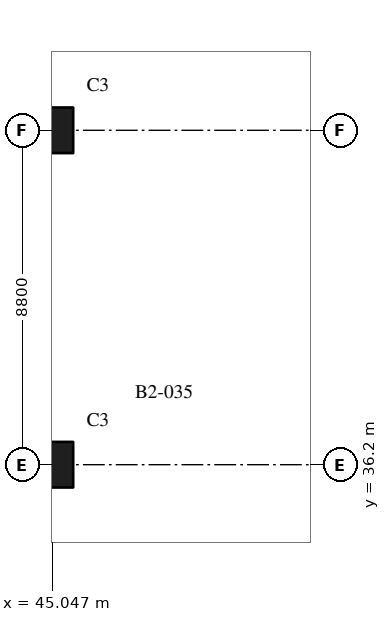
"""IFC4 building model, lengths in metres.
Left out: names, types, materials, properties, quantities, classifications, styles, units other than length and angle.
Written with IfcOpenShell. Run it as: python <this file> out.ifc"""

import sys

from ifc_helpers import new_model, si_unit, direction, frame, origin, origin_2d, place, context, subcontext, project, spatial, rectangle, extrude, element, save


model = new_model("IFC4")
c1 = context("Model", 3, precision=1e-05, world=origin(), true_north=direction((0.0, 1.0)))
c2 = subcontext(c1, "Body", "Model", "MODEL_VIEW")
j1 = project(units=[si_unit("LENGTHUNIT", "METRE"), si_unit("PLANEANGLEUNIT", "RADIAN")], contexts=[c1])
p1 = place(None, origin())
s1 = spatial("IfcSite", under=j1, at=p1, CompositionType="ELEMENT")
p2 = place(p1, origin())
s2 = spatial("IfcBuilding", under=s1, at=p2, CompositionType="ELEMENT")
p3 = place(p2, frame((0.0, 0.0, -12.0)))
s3 = spatial("IfcBuildingStorey", under=s2, at=p3, CompositionType="ELEMENT", Elevation=-12.0)
for number, where, z_axis, x_axis in (
    (1, (45.0, 36.2, 0.0), (0.0, 0.0, 1.0), (1.0, 0.0, 0.0)),
    (2, (45.0, 45.0, 0.0), (0.0, 0.0, 1.0), (1.0, 0.0, 0.0)),
):
    element("IfcColumn", number, at=place(p3, frame(where, z_axis=z_axis, x_axis=x_axis)), inside=s3, PredefinedType="COLUMN", context=c2, shape_type="SweptSolid", body=[
        extrude(rectangle(XDim=1.2, YDim=1.2, at=origin_2d()), origin(), (0.0, 0.0, 1.0), 5.0),
    ])
save(model, sys.argv[1])
